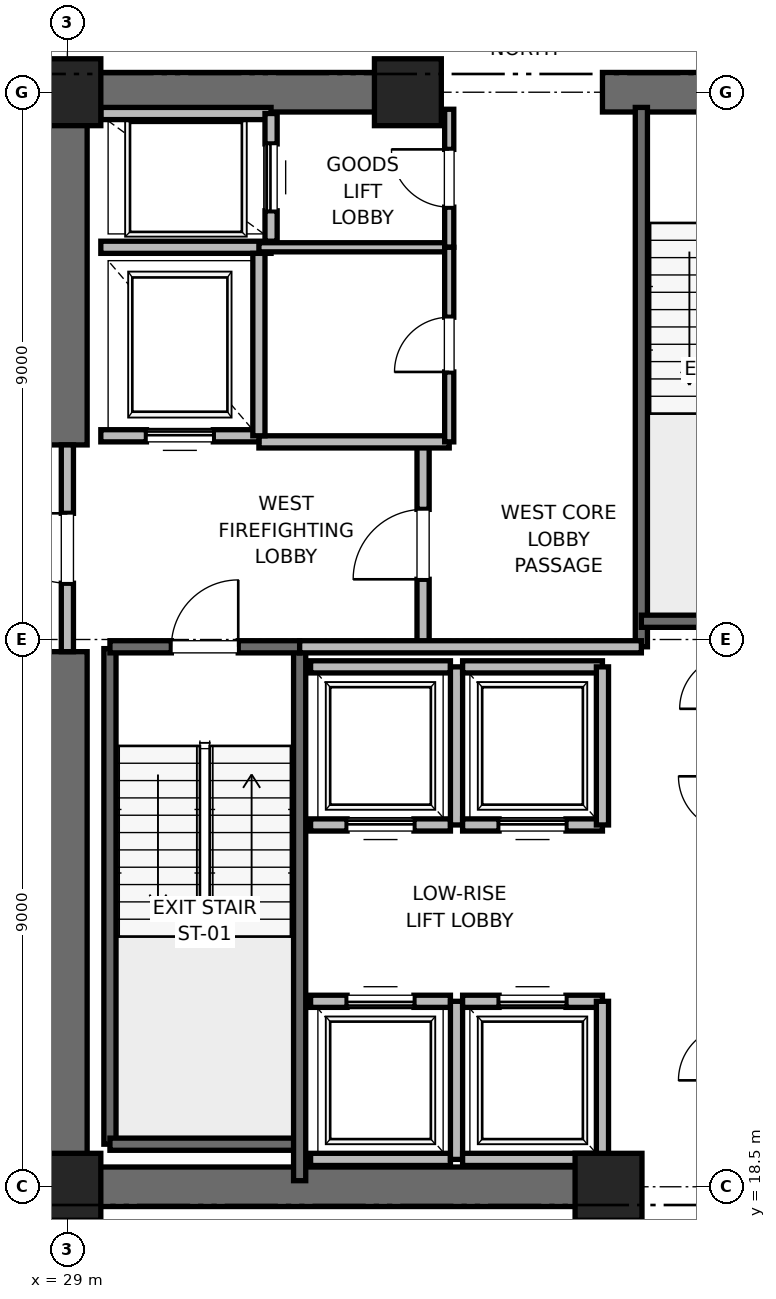
"""IFC4 building model, lengths in metres.
Left out: names, types, materials, properties, quantities, classifications, styles, units other than length and angle.
Written with IfcOpenShell. Run it as: python <this file> out.ifc"""

import sys

from ifc_helpers import new_model, si_unit, direction, frame, frame_2d, origin, origin_2d, place, context, subcontext, project, spatial, rectangle, extrude, element, fill, save


model = new_model("IFC4")
c1 = context("Model", 3, precision=1e-05, world=origin(), true_north=direction((0.0, 1.0)))
c2 = subcontext(c1, "Body", "Model", "MODEL_VIEW")
j1 = project(units=[si_unit("LENGTHUNIT", "METRE"), si_unit("PLANEANGLEUNIT", "RADIAN")], contexts=[c1])
p1 = place(None, origin())
s1 = spatial("IfcSite", under=j1, at=p1, CompositionType="ELEMENT")
p2 = place(p1, origin())
s2 = spatial("IfcBuilding", under=s1, at=p2, CompositionType="ELEMENT")
p3 = place(p2, frame((0.0, 0.0, 103.6)))
s3 = spatial("IfcBuildingStorey", under=s2, at=p3, CompositionType="ELEMENT", Elevation=103.6)
for number, where, z_axis, x_axis in (
    (1, (29.0, 18.5, 0.0), (0.0, 0.0, 1.0), (1.0, 0.0, 0.0)),
    (2, (29.0, 36.5, 0.0), (0.0, 0.0, 1.0), (1.0, 0.0, 0.0)),
    (3, (37.9, 18.5, 0.0), (0.0, 0.0, 1.0), (1.0, 0.0, 0.0)),
    (4, (34.6, 36.5, 0.0), (0.0, 0.0, 1.0), (1.0, 0.0, 0.0)),
):
    element("IfcColumn", number, at=place(p3, frame(where, z_axis=z_axis, x_axis=x_axis)), inside=s3, PredefinedType="PILASTER", context=c2, shape_type="SweptSolid", body=[
        extrude(rectangle(XDim=1.1, YDim=1.1, at=origin_2d()), origin(), (0.0, 0.0, 1.0), 4.0),
    ])
p4 = place(p3, frame((29.0, 18.5, 0.0), z_axis=(0.0, 0.0, 1.0), x_axis=(1.0, 0.0, 0.0)))
e5 = element("IfcWall", 5, at=p4, inside=s3, PredefinedType="SHEAR", context=c2, shape_type="SweptSolid", body=[
    extrude(rectangle(XDim=9.2, YDim=0.65, at=frame_2d((4.6, 0.0))), origin(), (0.0, 0.0, 1.0), 3.7),
])
p5 = place(p3, frame((29.0, 36.5, 0.0), z_axis=(0.0, 0.0, 1.0), x_axis=(1.0, 0.0, 0.0)))
e6 = element("IfcWall", 6, at=p5, inside=s3, PredefinedType="SHEAR", context=c2, shape_type="SweptSolid", body=[
    extrude(rectangle(XDim=5.8, YDim=0.65, at=frame_2d((2.9, 0.0))), origin(), (0.0, 0.0, 1.0), 3.7),
])
p6 = place(p3, frame((37.8, 36.5, 0.0), z_axis=(0.0, 0.0, 1.0), x_axis=(1.0, 0.0, 0.0)))
e7 = element("IfcWall", 7, at=p6, inside=s3, PredefinedType="SHEAR", context=c2, shape_type="SweptSolid", body=[
    extrude(rectangle(XDim=4.4, YDim=0.65, at=frame_2d((2.2, 0.0))), origin(), (0.0, 0.0, 1.0), 3.7),
])
p7 = place(p6, frame((1.65, 0.0, 0.0)))
e8 = element("IfcOpeningElement", 8, at=p7, cuts=e7, PredefinedType="OPENING", context=c2, shape_type="SweptSolid", body=[
    extrude(rectangle(XDim=1.1, YDim=2.15, at=frame_2d((0.55, 1.075))), frame((0.0, 0.325, 0.0), z_axis=(0.0, -1.0, 0.0), x_axis=(1.0, 0.0, 0.0)), (0.0, 0.0, 1.0), 0.65),
])
p8 = place(p3, frame((29.0, 18.5, 0.0), z_axis=(0.0, 0.0, 1.0), x_axis=(0.0, 1.0, 0.0)))
e9 = element("IfcWall", 9, at=p8, inside=s3, PredefinedType="SHEAR", context=c2, shape_type="SweptSolid", body=[
    extrude(rectangle(XDim=8.8, YDim=0.65, at=frame_2d((4.4, 0.0))), origin(), (0.0, 0.0, 1.0), 3.7),
])
p9 = place(p3, frame((29.0, 30.7, 0.0), z_axis=(0.0, 0.0, 1.0), x_axis=(0.0, 1.0, 0.0)))
e10 = element("IfcWall", 10, at=p9, inside=s3, PredefinedType="SHEAR", context=c2, shape_type="SweptSolid", body=[
    extrude(rectangle(XDim=5.8, YDim=0.65, at=frame_2d((2.9, 0.0))), origin(), (0.0, 0.0, 1.0), 3.7),
])
p10 = place(p3, frame((29.7, 19.2, 0.0), z_axis=(0.0, 0.0, 1.0), x_axis=(0.0, 1.0, 0.0)))
e11 = element("IfcWall", 11, at=p10, inside=s3, PredefinedType="SOLIDWALL", context=c2, shape_type="SweptSolid", body=[
    extrude(rectangle(XDim=8.15, YDim=0.2, at=frame_2d((4.075, 0.0))), origin(), (0.0, 0.0, 1.0), 3.7),
])
p11 = place(p3, frame((29.7, 19.2, 0.0), z_axis=(0.0, 0.0, 1.0), x_axis=(1.0, 0.0, 0.0)))
e12 = element("IfcWall", 12, at=p11, inside=s3, PredefinedType="SOLIDWALL", context=c2, shape_type="SweptSolid", body=[
    extrude(rectangle(XDim=3.12, YDim=0.2, at=frame_2d((1.56, 0.0))), origin(), (0.0, 0.0, 1.0), 3.7),
])
p12 = place(p3, frame((32.82, 18.6, 0.0), z_axis=(0.0, 0.0, 1.0), x_axis=(0.0, 1.0, 0.0)))
e13 = element("IfcWall", 13, at=p12, inside=s3, PredefinedType="SOLIDWALL", context=c2, shape_type="SweptSolid", body=[
    extrude(rectangle(XDim=8.78, YDim=0.2, at=frame_2d((4.39, 0.0))), origin(), (0.0, 0.0, 1.0), 3.7),
])
p13 = place(p3, frame((29.7, 27.38, 0.0), z_axis=(0.0, 0.0, 1.0), x_axis=(1.0, 0.0, 0.0)))
e14 = element("IfcWall", 14, at=p13, inside=s3, PredefinedType="SOLIDWALL", context=c2, shape_type="SweptSolid", body=[
    extrude(rectangle(XDim=3.12, YDim=0.2, at=frame_2d((1.56, 0.0))), origin(), (0.0, 0.0, 1.0), 3.7),
])
p14 = place(p13, frame((1.01, 0.0, 0.0)))
e15 = element("IfcOpeningElement", 15, at=p14, cuts=e14, PredefinedType="OPENING", context=c2, shape_type="SweptSolid", body=[
    extrude(rectangle(XDim=1.1, YDim=2.15, at=frame_2d((0.55, 1.075))), frame((0.0, 0.1, 0.0), z_axis=(0.0, -1.0, 0.0), x_axis=(1.0, 0.0, 0.0)), (0.0, 0.0, 1.0), 0.2),
])
p15 = place(p3, frame((38.44, 27.38, 0.0), z_axis=(0.0, 0.0, 1.0), x_axis=(0.0, 1.0, 0.0)))
e16 = element("IfcWall", 16, at=p15, inside=s3, PredefinedType="SOLIDWALL", context=c2, shape_type="SweptSolid", body=[
    extrude(rectangle(XDim=8.87, YDim=0.2, at=frame_2d((4.435, 0.0))), origin(), (0.0, 0.0, 1.0), 3.7),
])
p16 = place(p3, frame((38.44, 27.8, 0.0), z_axis=(0.0, 0.0, 1.0), x_axis=(1.0, 0.0, 0.0)))
e17 = element("IfcWall", 17, at=p16, inside=s3, PredefinedType="SOLIDWALL", context=c2, shape_type="SweptSolid", body=[
    extrude(rectangle(XDim=3.32, YDim=0.2, at=frame_2d((1.66, 0.0))), origin(), (0.0, 0.0, 1.0), 3.7),
])
p17 = place(p3, frame((34.85, 27.38, 0.0), z_axis=(0.0, 0.0, 1.0), x_axis=(0.0, 1.0, 0.0)))
e18 = element("IfcWall", 18, at=p17, inside=s3, PredefinedType="PARTITIONING", context=c2, shape_type="SweptSolid", body=[
    extrude(rectangle(XDim=3.37, YDim=0.2, at=frame_2d((1.685, 0.0))), origin(), (0.0, 0.0, 1.0), 3.7),
])
p18 = place(p17, frame((1.11, 0.0, 0.0)))
e19 = element("IfcOpeningElement", 19, at=p18, cuts=e18, PredefinedType="OPENING", context=c2, shape_type="SweptSolid", body=[
    extrude(rectangle(XDim=1.15, YDim=2.2, at=frame_2d((0.575, 1.1))), frame((0.0, 0.1, 0.0), z_axis=(0.0, -1.0, 0.0), x_axis=(1.0, 0.0, 0.0)), (0.0, 0.0, 1.0), 0.2),
])
p19 = place(p3, frame((29.0, 27.3, 0.0), z_axis=(0.0, 0.0, 1.0), x_axis=(0.0, 1.0, 0.0)))
e20 = element("IfcWall", 20, at=p19, inside=s3, PredefinedType="PARTITIONING", context=c2, shape_type="SweptSolid", body=[
    extrude(rectangle(XDim=3.4, YDim=0.2, at=frame_2d((1.7, 0.0))), origin(), (0.0, 0.0, 1.0), 2.48),
])
p20 = place(p19, frame((1.125, 0.0, 0.0)))
e21 = element("IfcOpeningElement", 21, at=p20, cuts=e20, PredefinedType="OPENING", context=c2, shape_type="SweptSolid", body=[
    extrude(rectangle(XDim=1.15, YDim=2.2, at=frame_2d((0.575, 1.1))), frame((0.0, 0.1, 0.0), z_axis=(0.0, -1.0, 0.0), x_axis=(1.0, 0.0, 0.0)), (0.0, 0.0, 1.0), 0.2),
])
p21 = place(p3, frame((32.82, 27.38, 0.0), z_axis=(0.0, 0.0, 1.0), x_axis=(1.0, 0.0, 0.0)))
e22 = element("IfcWall", 22, at=p21, inside=s3, PredefinedType="PARTITIONING", context=c2, shape_type="SweptSolid", body=[
    extrude(rectangle(XDim=5.62, YDim=0.2, at=frame_2d((2.81, 0.0))), origin(), (0.0, 0.0, 1.0), 3.7),
])
p22 = place(p3, frame((32.15, 30.75, 0.0), z_axis=(0.0, 0.0, 1.0), x_axis=(1.0, 0.0, 0.0)))
e23 = element("IfcWall", 23, at=p22, inside=s3, PredefinedType="PARTITIONING", context=c2, shape_type="SweptSolid", body=[
    extrude(rectangle(XDim=3.13, YDim=0.2, at=frame_2d((1.565, 0.0))), origin(), (0.0, 0.0, 1.0), 3.7),
])
p23 = place(p3, frame((29.55, 30.85, 0.0), z_axis=(0.0, 0.0, 1.0), x_axis=(1.0, 0.0, 0.0)))
e24 = element("IfcWall", 24, at=p23, inside=s3, PredefinedType="SOLIDWALL", context=c2, shape_type="SweptSolid", body=[
    extrude(rectangle(XDim=2.6, YDim=0.2, at=frame_2d((1.3, 0.0))), origin(), (0.0, 0.0, 1.0), 2.48),
])
p24 = place(p23, frame((0.75, 0.0, 0.0)))
e25 = element("IfcOpeningElement", 25, at=p24, cuts=e24, PredefinedType="OPENING", context=c2, shape_type="SweptSolid", body=[
    extrude(rectangle(XDim=1.1, YDim=2.2, at=frame_2d((0.55, 1.1))), frame((0.0, 0.1, 0.0), z_axis=(0.0, -1.0, 0.0), x_axis=(1.0, 0.0, 0.0)), (0.0, 0.0, 1.0), 0.2),
])
p25 = place(p3, frame((29.55, 33.95, 0.0), z_axis=(0.0, 0.0, 1.0), x_axis=(1.0, 0.0, 0.0)))
e26 = element("IfcWall", 26, at=p25, inside=s3, PredefinedType="SOLIDWALL", context=c2, shape_type="SweptSolid", body=[
    extrude(rectangle(XDim=2.8, YDim=0.2, at=frame_2d((1.4, 0.0))), origin(), (0.0, 0.0, 1.0), 3.7),
])
p26 = place(p3, frame((32.15, 30.85, 0.0), z_axis=(0.0, 0.0, 1.0), x_axis=(0.0, 1.0, 0.0)))
e27 = element("IfcWall", 27, at=p26, inside=s3, PredefinedType="SOLIDWALL", context=c2, shape_type="SweptSolid", body=[
    extrude(rectangle(XDim=3.0, YDim=0.2, at=frame_2d((1.5, 0.0))), origin(), (0.0, 0.0, 1.0), 3.7),
])
p27 = place(p3, frame((32.35, 36.15, 0.0), z_axis=(0.0, 0.0, 1.0), x_axis=(-1.0, 0.0, 0.0)))
e28 = element("IfcWall", 28, at=p27, inside=s3, PredefinedType="SOLIDWALL", context=c2, shape_type="SweptSolid", body=[
    extrude(rectangle(XDim=2.8, YDim=0.2, at=frame_2d((1.4, 0.0))), origin(), (0.0, 0.0, 1.0), 2.753),
])
p28 = place(p3, frame((32.35, 34.05, 0.0), z_axis=(0.0, 0.0, 1.0), x_axis=(0.0, 1.0, 0.0)))
e29 = element("IfcWall", 29, at=p28, inside=s3, PredefinedType="SOLIDWALL", context=c2, shape_type="SweptSolid", body=[
    extrude(rectangle(XDim=2.1, YDim=0.2, at=frame_2d((1.05, 0.0))), origin(), (0.0, 0.0, 1.0), 3.7),
])
p29 = place(p28, frame((0.5, 0.0, 0.0)))
e30 = element("IfcOpeningElement", 30, at=p29, cuts=e29, PredefinedType="OPENING", context=c2, shape_type="SweptSolid", body=[
    extrude(rectangle(XDim=1.1, YDim=2.2, at=frame_2d((0.55, 1.1))), frame((0.0, 0.1, 0.0), z_axis=(0.0, -1.0, 0.0), x_axis=(1.0, 0.0, 0.0)), (0.0, 0.0, 1.0), 0.2),
])
p30 = place(p3, frame((33.0, 18.95, 0.0), z_axis=(0.0, 0.0, 1.0), x_axis=(1.0, 0.0, 0.0)))
e31 = element("IfcWall", 31, at=p30, inside=s3, PredefinedType="SOLIDWALL", context=c2, shape_type="SweptSolid", body=[
    extrude(rectangle(XDim=2.3, YDim=0.2, at=frame_2d((1.15, 0.0))), origin(), (0.0, 0.0, 1.0), 3.7),
])
p31 = place(p3, frame((35.3, 21.55, 0.0), z_axis=(0.0, 0.0, 1.0), x_axis=(-1.0, 0.0, 0.0)))
e32 = element("IfcWall", 32, at=p31, inside=s3, PredefinedType="SOLIDWALL", context=c2, shape_type="SweptSolid", body=[
    extrude(rectangle(XDim=2.3, YDim=0.2, at=frame_2d((1.15, 0.0))), origin(), (0.0, 0.0, 1.0), 3.7),
])
p32 = place(p31, frame((0.6, 0.0, 0.0)))
e33 = element("IfcOpeningElement", 33, at=p32, cuts=e32, PredefinedType="OPENING", context=c2, shape_type="SweptSolid", body=[
    extrude(rectangle(XDim=1.1, YDim=2.2, at=frame_2d((0.55, 1.1))), frame((0.0, 0.1, 0.0), z_axis=(0.0, -1.0, 0.0), x_axis=(1.0, 0.0, 0.0)), (0.0, 0.0, 1.0), 0.2),
])
p33 = place(p3, frame((35.4, 18.95, 0.0), z_axis=(0.0, 0.0, 1.0), x_axis=(0.0, 1.0, 0.0)))
e34 = element("IfcWall", 34, at=p33, inside=s3, PredefinedType="SOLIDWALL", context=c2, shape_type="SweptSolid", body=[
    extrude(rectangle(XDim=2.6, YDim=0.2, at=frame_2d((1.3, 0.0))), origin(), (0.0, 0.0, 1.0), 3.7),
])
p34 = place(p3, frame((35.5, 18.95, 0.0), z_axis=(0.0, 0.0, 1.0), x_axis=(1.0, 0.0, 0.0)))
e35 = element("IfcWall", 35, at=p34, inside=s3, PredefinedType="SOLIDWALL", context=c2, shape_type="SweptSolid", body=[
    extrude(rectangle(XDim=2.3, YDim=0.2, at=frame_2d((1.15, 0.0))), origin(), (0.0, 0.0, 1.0), 2.48),
])
p35 = place(p3, frame((37.8, 21.55, 0.0), z_axis=(0.0, 0.0, 1.0), x_axis=(-1.0, 0.0, 0.0)))
e36 = element("IfcWall", 36, at=p35, inside=s3, PredefinedType="SOLIDWALL", context=c2, shape_type="SweptSolid", body=[
    extrude(rectangle(XDim=2.3, YDim=0.2, at=frame_2d((1.15, 0.0))), origin(), (0.0, 0.0, 1.0), 3.7),
])
p36 = place(p35, frame((0.6, 0.0, 0.0)))
e37 = element("IfcOpeningElement", 37, at=p36, cuts=e36, PredefinedType="OPENING", context=c2, shape_type="SweptSolid", body=[
    extrude(rectangle(XDim=1.1, YDim=2.2, at=frame_2d((0.55, 1.1))), frame((0.0, 0.1, 0.0), z_axis=(0.0, -1.0, 0.0), x_axis=(1.0, 0.0, 0.0)), (0.0, 0.0, 1.0), 0.2),
])
p37 = place(p3, frame((37.8, 18.95, 0.0), z_axis=(0.0, 0.0, 1.0), x_axis=(0.0, 1.0, 0.0)))
e38 = element("IfcWall", 38, at=p37, inside=s3, PredefinedType="SOLIDWALL", context=c2, shape_type="SweptSolid", body=[
    extrude(rectangle(XDim=2.6, YDim=0.2, at=frame_2d((1.3, 0.0))), origin(), (0.0, 0.0, 1.0), 2.48),
])
p38 = place(p3, frame((33.0, 24.45, 0.0), z_axis=(0.0, 0.0, 1.0), x_axis=(1.0, 0.0, 0.0)))
e39 = element("IfcWall", 39, at=p38, inside=s3, PredefinedType="SOLIDWALL", context=c2, shape_type="SweptSolid", body=[
    extrude(rectangle(XDim=2.3, YDim=0.2, at=frame_2d((1.15, 0.0))), origin(), (0.0, 0.0, 1.0), 3.7),
])
p39 = place(p38, frame((0.6, 0.0, 0.0)))
e40 = element("IfcOpeningElement", 40, at=p39, cuts=e39, PredefinedType="OPENING", context=c2, shape_type="SweptSolid", body=[
    extrude(rectangle(XDim=1.1, YDim=2.2, at=frame_2d((0.55, 1.1))), frame((0.0, 0.1, 0.0), z_axis=(0.0, -1.0, 0.0), x_axis=(1.0, 0.0, 0.0)), (0.0, 0.0, 1.0), 0.2),
])
p40 = place(p3, frame((35.3, 27.05, 0.0), z_axis=(0.0, 0.0, 1.0), x_axis=(-1.0, 0.0, 0.0)))
e41 = element("IfcWall", 41, at=p40, inside=s3, PredefinedType="SOLIDWALL", context=c2, shape_type="SweptSolid", body=[
    extrude(rectangle(XDim=2.3, YDim=0.2, at=frame_2d((1.15, 0.0))), origin(), (0.0, 0.0, 1.0), 3.7),
])
p41 = place(p3, frame((35.4, 24.45, 0.0), z_axis=(0.0, 0.0, 1.0), x_axis=(0.0, 1.0, 0.0)))
e42 = element("IfcWall", 42, at=p41, inside=s3, PredefinedType="SOLIDWALL", context=c2, shape_type="SweptSolid", body=[
    extrude(rectangle(XDim=2.6, YDim=0.2, at=frame_2d((1.3, 0.0))), origin(), (0.0, 0.0, 1.0), 3.7),
])
p42 = place(p3, frame((35.5, 24.45, 0.0), z_axis=(0.0, 0.0, 1.0), x_axis=(1.0, 0.0, 0.0)))
e43 = element("IfcWall", 43, at=p42, inside=s3, PredefinedType="SOLIDWALL", context=c2, shape_type="SweptSolid", body=[
    extrude(rectangle(XDim=2.3, YDim=0.2, at=frame_2d((1.15, 0.0))), origin(), (0.0, 0.0, 1.0), 3.7),
])
p43 = place(p42, frame((0.6, 0.0, 0.0)))
e44 = element("IfcOpeningElement", 44, at=p43, cuts=e43, PredefinedType="OPENING", context=c2, shape_type="SweptSolid", body=[
    extrude(rectangle(XDim=1.1, YDim=2.2, at=frame_2d((0.55, 1.1))), frame((0.0, 0.1, 0.0), z_axis=(0.0, -1.0, 0.0), x_axis=(1.0, 0.0, 0.0)), (0.0, 0.0, 1.0), 0.2),
])
p44 = place(p3, frame((37.8, 27.05, 0.0), z_axis=(0.0, 0.0, 1.0), x_axis=(-1.0, 0.0, 0.0)))
e45 = element("IfcWall", 45, at=p44, inside=s3, PredefinedType="SOLIDWALL", context=c2, shape_type="SweptSolid", body=[
    extrude(rectangle(XDim=2.3, YDim=0.2, at=frame_2d((1.15, 0.0))), origin(), (0.0, 0.0, 1.0), 3.7),
])
p45 = place(p3, frame((37.8, 24.45, 0.0), z_axis=(0.0, 0.0, 1.0), x_axis=(0.0, 1.0, 0.0)))
e46 = element("IfcWall", 46, at=p45, inside=s3, PredefinedType="SOLIDWALL", context=c2, shape_type="SweptSolid", body=[
    extrude(rectangle(XDim=2.6, YDim=0.2, at=frame_2d((1.3, 0.0))), origin(), (0.0, 0.0, 1.0), 3.7),
])
p46 = place(p3, frame((32.15, 33.95, 0.0), z_axis=(0.0, 0.0, 1.0), x_axis=(1.0, 0.0, 0.0)))
e47 = element("IfcWall", 47, at=p46, inside=s3, PredefinedType="PARTITIONING", context=c2, shape_type="SweptSolid", body=[
    extrude(rectangle(XDim=3.13, YDim=0.15, at=frame_2d((1.565, 0.0))), origin(), (0.0, 0.0, 1.0), 2.85),
])
p47 = place(p3, frame((35.28, 33.95, 0.0), z_axis=(0.0, 0.0, 1.0), x_axis=(0.0, 1.0, 0.0)))
e48 = element("IfcWall", 48, at=p47, inside=s3, PredefinedType="PARTITIONING", context=c2, shape_type="SweptSolid", body=[
    extrude(rectangle(XDim=2.27, YDim=0.15, at=frame_2d((1.135, 0.0))), origin(), (0.0, 0.0, 1.0), 2.48),
])
p48 = place(p47, frame((0.66, 0.0, 0.0)))
e49 = element("IfcOpeningElement", 49, at=p48, cuts=e48, PredefinedType="OPENING", context=c2, shape_type="SweptSolid", body=[
    extrude(rectangle(XDim=0.95, YDim=2.15, at=frame_2d((0.475, 1.075))), frame((0.0, 0.075, 0.0), z_axis=(0.0, -1.0, 0.0), x_axis=(1.0, 0.0, 0.0)), (0.0, 0.0, 1.0), 0.15),
])
p49 = place(p3, frame((35.28, 30.75, 0.0), z_axis=(0.0, 0.0, 1.0), x_axis=(0.0, 1.0, 0.0)))
e50 = element("IfcWall", 50, at=p49, inside=s3, PredefinedType="PARTITIONING", context=c2, shape_type="SweptSolid", body=[
    extrude(rectangle(XDim=3.2, YDim=0.15, at=frame_2d((1.6, 0.0))), origin(), (0.0, 0.0, 1.0), 2.85),
])
p50 = place(p49, frame((1.15, 0.0, 0.0)))
e51 = element("IfcOpeningElement", 51, at=p50, cuts=e50, PredefinedType="OPENING", context=c2, shape_type="SweptSolid", body=[
    extrude(rectangle(XDim=0.9, YDim=2.1, at=frame_2d((0.45, 1.05))), frame((0.0, 0.075, 0.0), z_axis=(0.0, -1.0, 0.0), x_axis=(1.0, 0.0, 0.0)), (0.0, 0.0, 1.0), 0.15),
])
p51 = place(p14, origin())
e52 = element("IfcDoor", 52, at=p51, inside=s3, OperationType="SINGLE_SWING_RIGHT", PredefinedType="DOOR", context=c2, shape_type="SweptSolid", body=[
    extrude(rectangle(XDim=1.1, YDim=2.15, at=frame_2d((0.55, 1.075))), frame((0.0, 0.025, 0.0), z_axis=(0.0, -1.0, 0.0), x_axis=(1.0, 0.0, 0.0)), (0.0, 0.0, 1.0), 0.05),
])
fill(e15, e52)
p52 = place(p18, origin())
e53 = element("IfcDoor", 53, at=p52, inside=s3, OperationType="SINGLE_SWING_LEFT", PredefinedType="DOOR", context=c2, shape_type="SweptSolid", body=[
    extrude(rectangle(XDim=1.15, YDim=2.2, at=frame_2d((0.575, 1.1))), frame((0.0, 0.025, 0.0), z_axis=(0.0, -1.0, 0.0), x_axis=(1.0, 0.0, 0.0)), (0.0, 0.0, 1.0), 0.05),
])
fill(e19, e53)
p53 = place(p20, origin())
e54 = element("IfcDoor", 54, at=p53, inside=s3, OperationType="SINGLE_SWING_RIGHT", PredefinedType="DOOR", context=c2, shape_type="SweptSolid", body=[
    extrude(rectangle(XDim=1.15, YDim=2.2, at=frame_2d((0.575, 1.1))), frame((0.0, 0.025, 0.0), z_axis=(0.0, -1.0, 0.0), x_axis=(1.0, 0.0, 0.0)), (0.0, 0.0, 1.0), 0.05),
])
fill(e21, e54)
p54 = place(p24, origin())
e55 = element("IfcDoor", 55, at=p54, inside=s3, OperationType="SLIDING_TO_RIGHT", PredefinedType="DOOR", context=c2, shape_type="SweptSolid", body=[
    extrude(rectangle(XDim=1.1, YDim=2.2, at=frame_2d((0.55, 1.1))), frame((0.0, 0.025, 0.0), z_axis=(0.0, -1.0, 0.0), x_axis=(1.0, 0.0, 0.0)), (0.0, 0.0, 1.0), 0.05),
])
fill(e25, e55)
p55 = place(p29, origin())
e56 = element("IfcDoor", 56, at=p55, inside=s3, OperationType="SLIDING_TO_RIGHT", PredefinedType="DOOR", context=c2, shape_type="SweptSolid", body=[
    extrude(rectangle(XDim=1.1, YDim=2.2, at=frame_2d((0.55, 1.1))), frame((0.0, 0.025, 0.0), z_axis=(0.0, -1.0, 0.0), x_axis=(1.0, 0.0, 0.0)), (0.0, 0.0, 1.0), 0.05),
])
fill(e30, e56)
p56 = place(p32, origin())
e57 = element("IfcDoor", 57, at=p56, inside=s3, OperationType="SLIDING_TO_RIGHT", PredefinedType="DOOR", context=c2, shape_type="SweptSolid", body=[
    extrude(rectangle(XDim=1.1, YDim=2.2, at=frame_2d((0.55, 1.1))), frame((0.0, 0.025, 0.0), z_axis=(0.0, -1.0, 0.0), x_axis=(1.0, 0.0, 0.0)), (0.0, 0.0, 1.0), 0.05),
])
fill(e33, e57)
p57 = place(p36, origin())
e58 = element("IfcDoor", 58, at=p57, inside=s3, OperationType="SLIDING_TO_RIGHT", PredefinedType="DOOR", context=c2, shape_type="SweptSolid", body=[
    extrude(rectangle(XDim=1.1, YDim=2.2, at=frame_2d((0.55, 1.1))), frame((0.0, 0.025, 0.0), z_axis=(0.0, -1.0, 0.0), x_axis=(1.0, 0.0, 0.0)), (0.0, 0.0, 1.0), 0.05),
])
fill(e37, e58)
p58 = place(p39, origin())
e59 = element("IfcDoor", 59, at=p58, inside=s3, OperationType="SLIDING_TO_RIGHT", PredefinedType="DOOR", context=c2, shape_type="SweptSolid", body=[
    extrude(rectangle(XDim=1.1, YDim=2.2, at=frame_2d((0.55, 1.1))), frame((0.0, 0.025, 0.0), z_axis=(0.0, -1.0, 0.0), x_axis=(1.0, 0.0, 0.0)), (0.0, 0.0, 1.0), 0.05),
])
fill(e40, e59)
p59 = place(p43, origin())
e60 = element("IfcDoor", 60, at=p59, inside=s3, OperationType="SLIDING_TO_RIGHT", PredefinedType="DOOR", context=c2, shape_type="SweptSolid", body=[
    extrude(rectangle(XDim=1.1, YDim=2.2, at=frame_2d((0.55, 1.1))), frame((0.0, 0.025, 0.0), z_axis=(0.0, -1.0, 0.0), x_axis=(1.0, 0.0, 0.0)), (0.0, 0.0, 1.0), 0.05),
])
fill(e44, e60)
p60 = place(p48, origin())
e61 = element("IfcDoor", 61, at=p60, inside=s3, OperationType="SINGLE_SWING_RIGHT", PredefinedType="DOOR", context=c2, shape_type="SweptSolid", body=[
    extrude(rectangle(XDim=0.95, YDim=2.15, at=frame_2d((0.475, 1.075))), frame((0.0, 0.025, 0.0), z_axis=(0.0, -1.0, 0.0), x_axis=(1.0, 0.0, 0.0)), (0.0, 0.0, 1.0), 0.05),
])
fill(e49, e61)
p61 = place(p50, origin())
e62 = element("IfcDoor", 62, at=p61, inside=s3, OperationType="SINGLE_SWING_LEFT", PredefinedType="DOOR", context=c2, shape_type="SweptSolid", body=[
    extrude(rectangle(XDim=0.9, YDim=2.1, at=frame_2d((0.45, 1.05))), frame((0.0, 0.025, 0.0), z_axis=(0.0, -1.0, 0.0), x_axis=(1.0, 0.0, 0.0)), (0.0, 0.0, 1.0), 0.05),
])
fill(e51, e62)
save(model, sys.argv[1])
